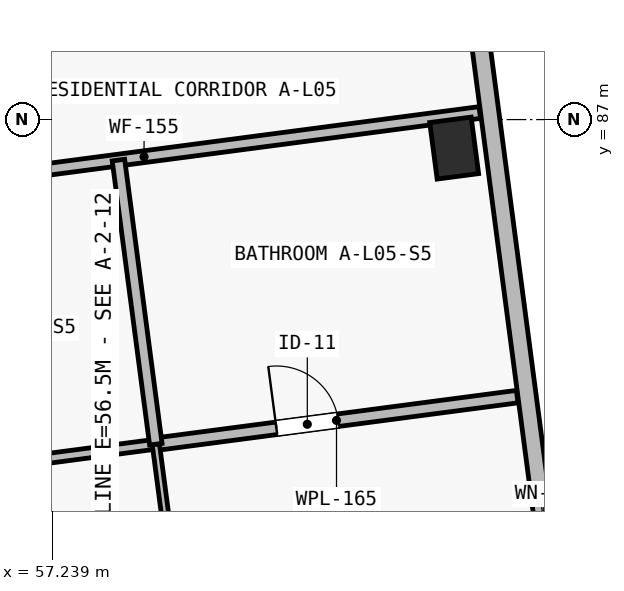
"""IFC4 building model, lengths in metres.
Left out: names, types, materials, properties, quantities, classifications, styles, units other than length and angle.
Written with IfcOpenShell. Run it as: python <this file> out.ifc"""

import sys

from ifc_helpers import new_model, si_unit, direction, frame, frame_2d, origin, origin_2d, place, context, subcontext, project, spatial, rectangle, extrude, element, fill, save


model = new_model("IFC4")
c1 = context("Model", 3, precision=1e-05, world=origin(), true_north=direction((0.0, 1.0)))
c2 = subcontext(c1, "Body", "Model", "MODEL_VIEW")
j1 = project(units=[si_unit("LENGTHUNIT", "METRE"), si_unit("PLANEANGLEUNIT", "RADIAN")], contexts=[c1])
p1 = place(None, origin())
s1 = spatial("IfcSite", under=j1, at=p1, CompositionType="ELEMENT")
p2 = place(p1, origin())
s2 = spatial("IfcBuilding", under=s1, at=p2, CompositionType="ELEMENT")
p3 = place(p2, frame((0.0, 0.0, 18.15)))
s3 = spatial("IfcBuildingStorey", under=s2, at=p3, CompositionType="ELEMENT", Elevation=18.15)
p4 = place(p3, frame((62.53, 86.625, 0.0), z_axis=(0.0, 0.0, 1.0), x_axis=(0.991444861374, 0.13052619222, 0.0)))
e1 = element("IfcColumn", 1, at=p4, inside=s3, PredefinedType="COLUMN", context=c2, shape_type="SweptSolid", body=[
    extrude(rectangle(XDim=0.55, YDim=0.75, at=origin_2d()), origin(), (0.0, 0.0, 1.0), 3.25),
])
p5 = place(p3, frame((61.39, 99.31, 0.0), z_axis=(0.0, 0.0, 1.0), x_axis=(0.13052411616, -0.99144513469, 0.0)))
e2 = element("IfcWall", 2, at=p5, inside=s3, PredefinedType="SOLIDWALL", context=c2, shape_type="SweptSolid", body=[
    extrude(rectangle(XDim=21.05, YDim=0.24, at=frame_2d((10.525, 0.0))), origin(), (0.0, 0.0, 1.0), 3.0),
])
p6 = place(p5, frame((2.63, 0.0, 0.52)))
e3 = element("IfcOpeningElement", 3, at=p6, cuts=e2, PredefinedType="OPENING", context=c2, shape_type="SweptSolid", body=[
    extrude(rectangle(XDim=0.74, YDim=2.26, at=frame_2d((0.37, 1.13))), frame((0.0, 0.135, 0.0), z_axis=(0.0, -1.0, 0.0), x_axis=(1.0, 0.0, 0.0)), (0.0, 0.0, 1.0), 0.27),
])
p7 = place(p5, frame((17.48, 0.0, 0.45)))
e4 = element("IfcOpeningElement", 4, at=p7, cuts=e2, PredefinedType="OPENING", context=c2, shape_type="SweptSolid", body=[
    extrude(rectangle(XDim=0.58, YDim=2.16, at=frame_2d((0.29, 1.08))), frame((0.0, 0.135, 0.0), z_axis=(0.0, -1.0, 0.0), x_axis=(1.0, 0.0, 0.0)), (0.0, 0.0, 1.0), 0.27),
])
p8 = place(p3, frame((54.033, 85.93, 0.0), z_axis=(0.0, 0.0, 1.0), x_axis=(0.991443380249, 0.130537441989, 0.0)))
e5 = element("IfcWall", 5, at=p8, inside=s3, PredefinedType="PARTITIONING", context=c2, shape_type="SweptSolid", body=[
    extrude(rectangle(XDim=8.91, YDim=0.155, at=frame_2d((4.455, 0.0))), origin(), (0.0, 0.0, 1.0), 2.97),
])
p9 = place(p8, frame((1.605, 0.0, 0.0)))
e6 = element("IfcOpeningElement", 6, at=p9, cuts=e5, PredefinedType="OPENING", context=c2, shape_type="SweptSolid", body=[
    extrude(rectangle(XDim=1.02, YDim=2.2, at=frame_2d((0.51, 1.1))), frame((0.0, 0.093, 0.0), z_axis=(0.0, -1.0, 0.0), x_axis=(1.0, 0.0, 0.0)), (0.0, 0.0, 1.0), 0.185),
])
p10 = place(p3, frame((54.357, 82.17, 0.0), z_axis=(0.0, 0.0, 1.0), x_axis=(0.991444014242, 0.130532626667, 0.0)))
e7 = element("IfcWall", 7, at=p10, inside=s3, PredefinedType="PARTITIONING", context=c2, shape_type="SweptSolid", body=[
    extrude(rectangle(XDim=4.285, YDim=0.13, at=frame_2d((2.143, 0.0))), origin(), (0.0, 0.0, 1.0), 2.97),
])
p11 = place(p10, frame((1.825, 0.0, 0.0)))
e8 = element("IfcOpeningElement", 8, at=p11, cuts=e7, PredefinedType="OPENING", context=c2, shape_type="SweptSolid", body=[
    extrude(rectangle(XDim=0.88, YDim=2.1, at=frame_2d((0.44, 1.05))), frame((0.0, 0.08, 0.0), z_axis=(0.0, -1.0, 0.0), x_axis=(1.0, 0.0, 0.0)), (0.0, 0.0, 1.0), 0.16),
])
p12 = place(p3, frame((58.605, 82.729, 0.0), z_axis=(0.0, 0.0, 1.0), x_axis=(0.991449269254, 0.130492706676, 0.0)))
e9 = element("IfcWall", 9, at=p12, inside=s3, PredefinedType="PLUMBINGWALL", context=c2, shape_type="SweptSolid", body=[
    extrude(rectangle(XDim=4.795, YDim=0.165, at=frame_2d((2.397, 0.0))), origin(), (0.0, 0.0, 1.0), 2.97),
])
p13 = place(p12, frame((1.6, 0.0, 0.0)))
e10 = element("IfcOpeningElement", 10, at=p13, cuts=e9, PredefinedType="OPENING", context=c2, shape_type="SweptSolid", body=[
    extrude(rectangle(XDim=0.82, YDim=2.08, at=frame_2d((0.41, 1.04))), frame((0.0, 0.097, 0.0), z_axis=(0.0, -1.0, 0.0), x_axis=(1.0, 0.0, 0.0)), (0.0, 0.0, 1.0), 0.195),
])
p14 = place(p3, frame((59.237, 77.931, 0.0), z_axis=(0.0, 0.0, 1.0), x_axis=(-0.130544545786, 0.991442444908, 0.0)))
e11 = element("IfcWall", 11, at=p14, inside=s3, PredefinedType="PARTITIONING", context=c2, shape_type="SweptSolid", body=[
    extrude(rectangle(XDim=4.84, YDim=0.095, at=frame_2d((2.42, 0.0))), origin(), (0.0, 0.0, 1.0), 2.97),
])
p15 = place(p14, frame((1.35, 0.0, 0.0)))
e12 = element("IfcOpeningElement", 12, at=p15, cuts=e11, PredefinedType="OPENING", context=c2, shape_type="SweptSolid", body=[
    extrude(rectangle(XDim=0.9, YDim=2.1, at=frame_2d((0.45, 1.05))), frame((0.0, 0.062, 0.0), z_axis=(0.0, -1.0, 0.0), x_axis=(1.0, 0.0, 0.0)), (0.0, 0.0, 1.0), 0.125),
])
p16 = place(p3, frame((58.605, 82.729, 0.0), z_axis=(0.0, 0.0, 1.0), x_axis=(-0.130496394248, 0.991448783896, 0.0)))
e13 = element("IfcWall", 13, at=p16, inside=s3, PredefinedType="PLUMBINGWALL", context=c2, shape_type="SweptSolid", body=[
    extrude(rectangle(XDim=3.77, YDim=0.165, at=frame_2d((1.885, 0.0))), origin(), (0.0, 0.0, 1.0), 2.97),
])
p17 = place(p7, origin())
e14 = element("IfcWindow", 14, at=p17, inside=s3, PartitioningType="SINGLE_PANEL", PredefinedType="WINDOW", context=c2, shape_type="SweptSolid", body=[
    extrude(rectangle(XDim=0.58, YDim=2.16, at=frame_2d((0.29, 1.08))), frame((0.0, 0.03, 0.0), z_axis=(0.0, -1.0, 0.0), x_axis=(1.0, 0.0, 0.0)), (0.0, 0.0, 1.0), 0.06),
])
fill(e4, e14)
p18 = place(p13, origin())
e15 = element("IfcDoor", 15, at=p18, inside=s3, OperationType="SINGLE_SWING_LEFT", PredefinedType="DOOR", context=c2, shape_type="SweptSolid", body=[
    extrude(rectangle(XDim=0.82, YDim=2.08, at=frame_2d((0.41, 1.04))), frame((0.0, 0.025, 0.0), z_axis=(0.0, -1.0, 0.0), x_axis=(1.0, 0.0, 0.0)), (0.0, 0.0, 1.0), 0.05),
])
fill(e10, e15)
save(model, sys.argv[1])
